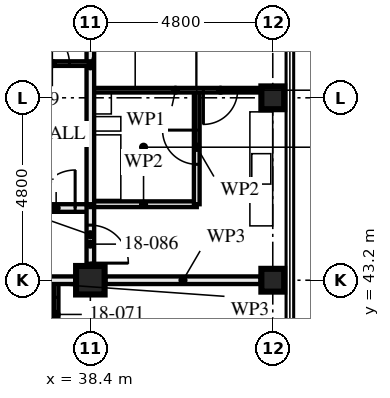
"""IFC4 building model, lengths in metres.
Left out: names, types, materials, properties, quantities, classifications, styles, units other than length and angle.
Written with IfcOpenShell. Run it as: python <this file> out.ifc"""

import sys

from ifc_helpers import new_model, si_unit, direction, frame, frame_2d, origin, origin_2d, place, context, subcontext, project, spatial, rectangle, hollow_rectangle, extrude, element, fill, save


model = new_model("IFC4")
c1 = context("Model", 3, precision=1e-05, world=origin(), true_north=direction((0.0, 1.0)))
c2 = subcontext(c1, "Body", "Model", "MODEL_VIEW")
j1 = project(units=[si_unit("LENGTHUNIT", "METRE"), si_unit("PLANEANGLEUNIT", "RADIAN")], contexts=[c1])
p1 = place(None, origin())
s1 = spatial("IfcSite", under=j1, at=p1, CompositionType="ELEMENT")
p2 = place(p1, origin())
s2 = spatial("IfcBuilding", under=s1, at=p2, CompositionType="ELEMENT")
p3 = place(p2, frame((0.0, 0.0, 69.0)))
s3 = spatial("IfcBuildingStorey", under=s2, at=p3, CompositionType="ELEMENT", Elevation=69.0)
p4 = place(p3, frame((38.4, 43.2, 0.0), z_axis=(0.0, 0.0, 1.0), x_axis=(0.0, 1.0, 0.0)))
e1 = element("IfcColumn", 1, at=p4, inside=s3, PredefinedType="COLUMN", context=c2, shape_type="SweptSolid", body=[
    extrude(hollow_rectangle(XDim=0.75, YDim=0.75, WallThickness=0.08, at=origin_2d()), origin(), (0.0, 0.0, 1.0), 3.5),
])
for number, where, z_axis, x_axis in (
    (2, (43.2, 43.2, 0.0), (0.0, 0.0, 1.0), (0.0, 1.0, 0.0)),
    (3, (43.2, 48.0, 0.0), (0.0, 0.0, 1.0), (1.0, 0.0, 0.0)),
):
    element("IfcColumn", number, at=place(p3, frame(where, z_axis=z_axis, x_axis=x_axis)), inside=s3, PredefinedType="COLUMN", context=c2, shape_type="SweptSolid", body=[
        extrude(hollow_rectangle(XDim=0.6, YDim=0.6, WallThickness=0.08, at=origin_2d()), origin(), (0.0, 0.0, 1.0), 3.5),
    ])
p5 = place(p3, frame((37.5, 38.4, 0.0), z_axis=(0.0, 0.0, 1.0), x_axis=(0.0, 1.0, 0.0)))
e4 = element("IfcWall", 4, at=p5, inside=s3, PredefinedType="PARTITIONING", context=c2, shape_type="SweptSolid", body=[
    extrude(rectangle(XDim=4.8, YDim=0.12, at=frame_2d((2.4, 0.0))), origin(), (0.0, 0.0, 1.0), 3.33),
])
p6 = place(p5, frame((3.45, 0.0, 0.0)))
e5 = element("IfcOpeningElement", 5, at=p6, cuts=e4, PredefinedType="OPENING", context=c2, shape_type="SweptSolid", body=[
    extrude(rectangle(XDim=0.9, YDim=2.1, at=frame_2d((0.45, 1.05))), frame((0.0, 0.071, 0.0), z_axis=(0.0, -1.0, 0.0), x_axis=(1.0, 0.0, 0.0)), (0.0, 0.0, 1.0), 0.141),
])
p7 = place(p3, frame((41.2, 48.2, 0.0), z_axis=(0.0, 0.0, 1.0), x_axis=(0.0, -1.0, 0.0)))
e6 = element("IfcWall", 6, at=p7, inside=s3, PredefinedType="PARTITIONING", context=c2, shape_type="SweptSolid", body=[
    extrude(rectangle(XDim=3.0, YDim=0.15, at=frame_2d((1.5, 0.0))), origin(), (0.0, 0.0, 1.0), 2.55),
])
p8 = place(p7, frame((1.05, 0.0, 0.0)))
e7 = element("IfcOpeningElement", 7, at=p8, cuts=e6, PredefinedType="OPENING", context=c2, shape_type="SweptSolid", body=[
    extrude(rectangle(XDim=0.9, YDim=2.1, at=frame_2d((0.45, 1.05))), frame((0.0, 0.085, 0.0), z_axis=(0.0, -1.0, 0.0), x_axis=(1.0, 0.0, 0.0)), (0.0, 0.0, 1.0), 0.171),
])
p9 = place(p3, frame((41.2, 45.2, 0.0), z_axis=(0.0, 0.0, 1.0), x_axis=(-1.0, 0.0, 0.0)))
e8 = element("IfcWall", 8, at=p9, inside=s3, PredefinedType="PARTITIONING", context=c2, shape_type="SweptSolid", body=[
    extrude(rectangle(XDim=2.8, YDim=0.15, at=frame_2d((1.4, 0.0))), origin(), (0.0, 0.0, 1.0), 3.33),
])
p10 = place(p3, frame((42.88, 48.2, 0.0), z_axis=(0.0, 0.0, 1.0), x_axis=(-1.0, 0.0, 0.0)))
e9 = element("IfcWall", 9, at=p10, inside=s3, PredefinedType="PARTITIONING", context=c2, shape_type="SweptSolid", body=[
    extrude(rectangle(XDim=4.48, YDim=0.12, at=frame_2d((2.24, 0.0))), origin(), (0.0, 0.0, 1.0), 3.33),
])
p11 = place(p10, frame((0.605, 0.0, 0.0)))
e10 = element("IfcOpeningElement", 10, at=p11, cuts=e9, PredefinedType="OPENING", context=c2, shape_type="SweptSolid", body=[
    extrude(rectangle(XDim=0.9, YDim=2.1, at=frame_2d((0.45, 1.05))), frame((0.0, 0.071, 0.0), z_axis=(0.0, -1.0, 0.0), x_axis=(1.0, 0.0, 0.0)), (0.0, 0.0, 1.0), 0.141),
])
p12 = place(p3, frame((38.4, 52.48, 0.0), z_axis=(0.0, 0.0, 1.0), x_axis=(0.0, -1.0, 0.0)))
e11 = element("IfcWall", 11, at=p12, inside=s3, PredefinedType="PARTITIONING", context=c2, shape_type="SweptSolid", body=[
    extrude(rectangle(XDim=7.28, YDim=0.2, at=frame_2d((3.64, 0.0))), origin(), (0.0, 0.0, 1.0), 2.55),
])
p13 = place(p3, frame((38.4, 48.9, 0.0), z_axis=(0.0, 0.0, 1.0), x_axis=(-1.0, 0.0, 0.0)))
e12 = element("IfcWall", 12, at=p13, inside=s3, PredefinedType="PARTITIONING", context=c2, shape_type="SweptSolid", body=[
    extrude(rectangle(XDim=2.0, YDim=0.12, at=frame_2d((1.0, 0.0))), origin(), (0.0, 0.0, 1.0), 3.33),
])
p14 = place(p13, frame((0.55, 0.0, 0.0)))
e13 = element("IfcOpeningElement", 13, at=p14, cuts=e12, PredefinedType="OPENING", context=c2, shape_type="SweptSolid", body=[
    extrude(rectangle(XDim=0.9, YDim=2.1, at=frame_2d((0.45, 1.05))), frame((0.0, 0.071, 0.0), z_axis=(0.0, -1.0, 0.0), x_axis=(1.0, 0.0, 0.0)), (0.0, 0.0, 1.0), 0.141),
])
p15 = place(p3, frame((38.4, 45.1, 0.0), z_axis=(0.0, 0.0, 1.0), x_axis=(-1.0, 0.0, 0.0)))
e14 = element("IfcWall", 14, at=p15, inside=s3, PredefinedType="PARTITIONING", context=c2, shape_type="SweptSolid", body=[
    extrude(rectangle(XDim=9.6, YDim=0.2, at=frame_2d((4.8, 0.0))), origin(), (0.0, 0.0, 1.0), 3.33),
])
p16 = place(p15, frame((0.4, 0.0, 0.0)))
e15 = element("IfcOpeningElement", 15, at=p16, cuts=e14, PredefinedType="OPENING", context=c2, shape_type="SweptSolid", body=[
    extrude(rectangle(XDim=1.0, YDim=2.1, at=frame_2d((0.5, 1.05))), frame((0.0, 0.111, 0.0), z_axis=(0.0, -1.0, 0.0), x_axis=(1.0, 0.0, 0.0)), (0.0, 0.0, 1.0), 0.221),
])
p17 = place(p15, frame((5.2, 0.0, 0.0)))
e16 = element("IfcOpeningElement", 16, at=p17, cuts=e14, PredefinedType="OPENING", context=c2, shape_type="SweptSolid", body=[
    extrude(rectangle(XDim=1.0, YDim=2.1, at=frame_2d((0.5, 1.05))), frame((0.0, 0.111, 0.0), z_axis=(0.0, -1.0, 0.0), x_axis=(1.0, 0.0, 0.0)), (0.0, 0.0, 1.0), 0.221),
])
p18 = place(p3, frame((38.4, 45.2, 0.0), z_axis=(0.0, 0.0, 1.0), x_axis=(0.0, -1.0, 0.0)))
e17 = element("IfcWall", 17, at=p18, inside=s3, PredefinedType="PARTITIONING", context=c2, shape_type="SweptSolid", body=[
    extrude(rectangle(XDim=1.605, YDim=0.2, at=frame_2d((0.802, 0.0))), origin(), (0.0, 0.0, 1.0), 3.33),
])
p19 = place(p18, frame((0.55, 0.0, 0.0)))
e18 = element("IfcOpeningElement", 18, at=p19, cuts=e17, PredefinedType="OPENING", context=c2, shape_type="SweptSolid", body=[
    extrude(rectangle(XDim=1.0, YDim=2.1, at=frame_2d((0.5, 1.05))), frame((0.0, 0.111, 0.0), z_axis=(0.0, -1.0, 0.0), x_axis=(1.0, 0.0, 0.0)), (0.0, 0.0, 1.0), 0.221),
])
p20 = place(p3, frame((42.88, 43.2, 0.0), z_axis=(0.0, 0.0, 1.0), x_axis=(-1.0, 0.0, 0.0)))
e19 = element("IfcWall", 19, at=p20, inside=s3, PredefinedType="PARTITIONING", context=c2, shape_type="SweptSolid", body=[
    extrude(rectangle(XDim=4.085, YDim=0.2, at=frame_2d((2.042, 0.0))), origin(), (0.0, 0.0, 1.0), 2.32),
])
p21 = place(p3, frame((38.005, 43.2, 0.0), z_axis=(0.0, 0.0, 1.0), x_axis=(-1.0, 0.0, 0.0)))
e20 = element("IfcWall", 20, at=p21, inside=s3, PredefinedType="PARTITIONING", context=c2, shape_type="SweptSolid", body=[
    extrude(rectangle(XDim=4.01, YDim=0.2, at=frame_2d((2.005, 0.0))), origin(), (0.0, 0.0, 1.0), 2.32),
])
p22 = place(p6, origin())
e21 = element("IfcDoor", 21, at=p22, inside=s3, OperationType="SINGLE_SWING_LEFT", PredefinedType="DOOR", context=c2, shape_type="SweptSolid", body=[
    extrude(rectangle(XDim=0.9, YDim=2.1, at=frame_2d((0.45, 1.05))), frame((0.0, 0.022, 0.0), z_axis=(0.0, -1.0, 0.0), x_axis=(1.0, 0.0, 0.0)), (0.0, 0.0, 1.0), 0.044),
])
fill(e5, e21)
p23 = place(p8, frame((0.9, 0.0, 0.0), z_axis=(0.0, 0.0, 1.0), x_axis=(-1.0, 0.0, 0.0)))
e22 = element("IfcDoor", 22, at=p23, inside=s3, OperationType="SINGLE_SWING_LEFT", PredefinedType="DOOR", context=c2, shape_type="SweptSolid", body=[
    extrude(rectangle(XDim=0.9, YDim=2.1, at=frame_2d((0.45, 1.05))), frame((0.0, 0.022, 0.0), z_axis=(0.0, -1.0, 0.0), x_axis=(1.0, 0.0, 0.0)), (0.0, 0.0, 1.0), 0.044),
])
fill(e7, e22)
p24 = place(p11, origin())
e23 = element("IfcDoor", 23, at=p24, inside=s3, OperationType="SINGLE_SWING_LEFT", PredefinedType="DOOR", context=c2, shape_type="SweptSolid", body=[
    extrude(rectangle(XDim=0.9, YDim=2.1, at=frame_2d((0.45, 1.05))), frame((0.0, 0.022, 0.0), z_axis=(0.0, -1.0, 0.0), x_axis=(1.0, 0.0, 0.0)), (0.0, 0.0, 1.0), 0.044),
])
fill(e10, e23)
p25 = place(p14, frame((0.9, 0.0, 0.0), z_axis=(0.0, 0.0, 1.0), x_axis=(-1.0, 0.0, 0.0)))
e24 = element("IfcDoor", 24, at=p25, inside=s3, OperationType="SINGLE_SWING_RIGHT", PredefinedType="DOOR", context=c2, shape_type="SweptSolid", body=[
    extrude(rectangle(XDim=0.9, YDim=2.1, at=frame_2d((0.45, 1.05))), frame((0.0, 0.022, 0.0), z_axis=(0.0, -1.0, 0.0), x_axis=(1.0, 0.0, 0.0)), (0.0, 0.0, 1.0), 0.044),
])
fill(e13, e24)
p26 = place(p16, frame((1.0, 0.0, 0.0), z_axis=(0.0, 0.0, 1.0), x_axis=(-1.0, 0.0, 0.0)))
e25 = element("IfcDoor", 25, at=p26, inside=s3, OperationType="SINGLE_SWING_LEFT", PredefinedType="DOOR", context=c2, shape_type="SweptSolid", body=[
    extrude(rectangle(XDim=1.0, YDim=2.1, at=frame_2d((0.5, 1.05))), frame((0.0, 0.027, 0.0), z_axis=(0.0, -1.0, 0.0), x_axis=(1.0, 0.0, 0.0)), (0.0, 0.0, 1.0), 0.054),
])
fill(e15, e25)
p27 = place(p19, origin())
e26 = element("IfcDoor", 26, at=p27, inside=s3, OperationType="SINGLE_SWING_LEFT", PredefinedType="DOOR", context=c2, shape_type="SweptSolid", body=[
    extrude(rectangle(XDim=1.0, YDim=2.1, at=frame_2d((0.5, 1.05))), frame((0.0, 0.027, 0.0), z_axis=(0.0, -1.0, 0.0), x_axis=(1.0, 0.0, 0.0)), (0.0, 0.0, 1.0), 0.054),
])
fill(e18, e26)
save(model, sys.argv[1])
